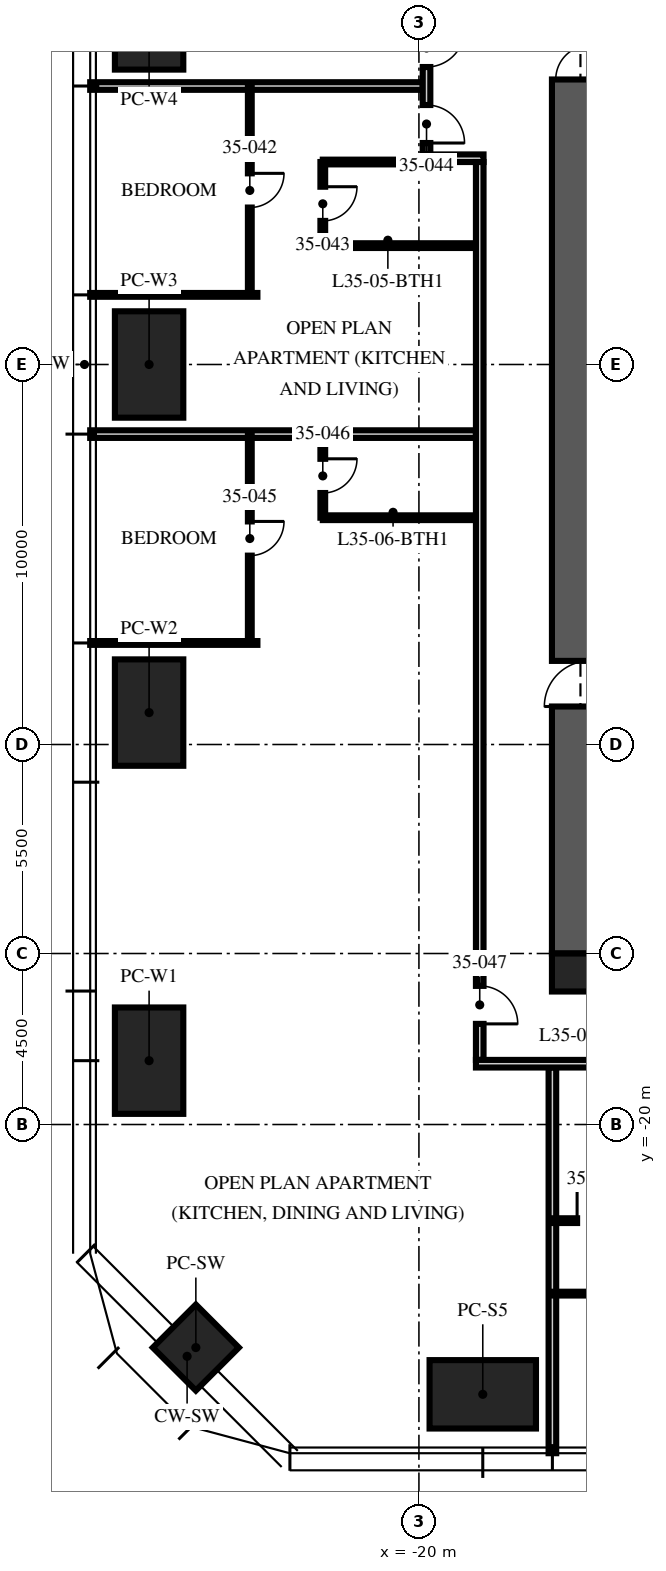
"""IFC4 building model, lengths in metres.
Left out: names, types, materials, properties, quantities, classifications, styles, units other than length and angle.
Written with IfcOpenShell. Run it as: python <this file> out.ifc"""

import sys

from ifc_helpers import new_model, si_unit, direction, frame, frame_2d, origin, origin_2d, place, context, subcontext, project, spatial, rectangle, extrude, element, fill, save


model = new_model("IFC4")
c1 = context("Model", 3, precision=1e-05, world=origin(), true_north=direction((0.0, 1.0)))
c2 = subcontext(c1, "Body", "Model", "MODEL_VIEW")
j1 = project(units=[si_unit("LENGTHUNIT", "METRE"), si_unit("PLANEANGLEUNIT", "RADIAN")], contexts=[c1])
p1 = place(None, origin())
s1 = spatial("IfcSite", under=j1, at=p1, CompositionType="ELEMENT")
p2 = place(p1, origin())
s2 = spatial("IfcBuilding", under=s1, at=p2, CompositionType="ELEMENT")
p3 = place(p2, frame((0.0, 0.0, 141.0)))
s3 = spatial("IfcBuildingStorey", under=s2, at=p3, CompositionType="ELEMENT", Elevation=141.0)
p4 = place(p3, frame((-15.5, -15.5, -0.25), z_axis=(0.0, 0.0, 1.0), x_axis=(0.0, 1.0, 0.0)))
e1 = element("IfcWall", 1, at=p4, inside=s3, PredefinedType="SHEAR", context=c2, shape_type="SweptSolid", body=[
    extrude(rectangle(XDim=31.0, YDim=2.0, at=frame_2d((15.5, 0.0))), origin(), (0.0, 0.0, 1.0), 3.75),
])
p5 = place(p4, frame((6.5, 0.0, 0.25)))
e2 = element("IfcOpeningElement", 2, at=p5, cuts=e1, PredefinedType="OPENING", context=c2, shape_type="SweptSolid", body=[
    extrude(rectangle(XDim=1.2, YDim=2.1, at=frame_2d((0.6, 1.05))), frame((0.0, 1.01, 0.0), z_axis=(0.0, -1.0, 0.0), x_axis=(1.0, 0.0, 0.0)), (0.0, 0.0, 1.0), 2.02),
])
p6 = place(p4, frame((23.0, 0.0, 0.25)))
e3 = element("IfcOpeningElement", 3, at=p6, cuts=e1, PredefinedType="OPENING", context=c2, shape_type="SweptSolid", body=[
    extrude(rectangle(XDim=1.8, YDim=2.1, at=frame_2d((0.9, 1.05))), frame((0.0, 1.01, 0.0), z_axis=(0.0, -1.0, 0.0), x_axis=(1.0, 0.0, 0.0)), (0.0, 0.0, 1.0), 2.02),
])
p7 = place(p3, frame((-16.0, -16.0, -0.25), z_axis=(0.0, 0.0, 1.0), x_axis=(1.0, 0.0, 0.0)))
e4 = element("IfcColumn", 4, at=p7, inside=s3, PredefinedType="COLUMN", context=c2, shape_type="SweptSolid", body=[
    extrude(rectangle(XDim=1.0, YDim=1.0, at=origin_2d()), origin(), (0.0, 0.0, 1.0), 3.75),
])
for number, where, z_axis, x_axis in (
    (5, (-18.32, -27.1, 0.0), (0.0, 0.0, 1.0), (1.0, 0.0, 0.0)),
    (6, (-27.1, -18.32, 0.0), (0.0, 0.0, 1.0), (0.0, 1.0, 0.0)),
    (7, (-27.1, -9.16, 0.0), (0.0, 0.0, 1.0), (0.0, 1.0, 0.0)),
    (8, (-27.1, 0.0, 0.0), (0.0, 0.0, 1.0), (0.0, 1.0, 0.0)),
    (9, (-27.1, 9.16, 0.0), (0.0, 0.0, 1.0), (0.0, 1.0, 0.0)),
):
    element("IfcColumn", number, at=place(p3, frame(where, z_axis=z_axis, x_axis=x_axis)), inside=s3, PredefinedType="COLUMN", context=c2, shape_type="SweptSolid", body=[
        extrude(rectangle(XDim=2.8, YDim=1.8, at=origin_2d()), origin(), (0.0, 0.0, 1.0), 3.75),
    ])
p8 = place(p3, frame((-25.87, -25.87, 0.0), z_axis=(0.0, 0.0, 1.0), x_axis=(0.707106781187, -0.707106781187, 0.0)))
e10 = element("IfcColumn", 10, at=p8, inside=s3, PredefinedType="COLUMN", context=c2, shape_type="SweptSolid", body=[
    extrude(rectangle(XDim=1.6, YDim=1.6, at=origin_2d()), origin(), (0.0, 0.0, 1.0), 3.75),
])
p9 = place(p3, frame((-19.9, 7.328, 0.0), z_axis=(0.0, 0.0, 1.0), x_axis=(-1.0, 0.0, 0.0)))
e11 = element("IfcWall", 11, at=p9, inside=s3, PredefinedType="PARTITIONING", context=c2, shape_type="SweptSolid", body=[
    extrude(rectangle(XDim=8.75, YDim=0.2, at=frame_2d((4.375, 0.0))), origin(), (0.0, 0.0, 1.0), 2.81),
])
p10 = place(p3, frame((-24.25, 1.832, 0.0), z_axis=(0.0, 0.0, 1.0), x_axis=(-1.0, 0.0, 0.0)))
e12 = element("IfcWall", 12, at=p10, inside=s3, PredefinedType="PARTITIONING", context=c2, shape_type="SweptSolid", body=[
    extrude(rectangle(XDim=4.4, YDim=0.1, at=frame_2d((2.2, 0.0))), origin(), (0.0, 0.0, 1.0), 2.81),
])
p11 = place(p3, frame((-18.5, -1.832, 0.0), z_axis=(0.0, 0.0, 1.0), x_axis=(-1.0, 0.0, 0.0)))
e13 = element("IfcWall", 13, at=p11, inside=s3, PredefinedType="PARTITIONING", context=c2, shape_type="SweptSolid", body=[
    extrude(rectangle(XDim=10.15, YDim=0.2, at=frame_2d((5.075, 0.0))), origin(), (0.0, 0.0, 1.0), 2.81),
])
p12 = place(p3, frame((-24.25, -7.328, 0.0), z_axis=(0.0, 0.0, 1.0), x_axis=(-1.0, 0.0, 0.0)))
e14 = element("IfcWall", 14, at=p12, inside=s3, PredefinedType="PARTITIONING", context=c2, shape_type="SweptSolid", body=[
    extrude(rectangle(XDim=4.4, YDim=0.1, at=frame_2d((2.2, 0.0))), origin(), (0.0, 0.0, 1.0), 2.81),
])
p13 = place(p3, frame((-16.488, -18.5, 0.0), z_axis=(0.0, 0.0, 1.0), x_axis=(0.0, -1.0, 0.0)))
e15 = element("IfcWall", 15, at=p13, inside=s3, PredefinedType="PARTITIONING", context=c2, shape_type="SweptSolid", body=[
    extrude(rectangle(XDim=10.15, YDim=0.2, at=frame_2d((5.075, 0.0))), origin(), (0.0, 0.0, 1.0), 2.81),
])
p14 = place(p3, frame((-24.45, 7.328, 0.0), z_axis=(0.0, 0.0, 1.0), x_axis=(0.0, -1.0, 0.0)))
e16 = element("IfcWall", 16, at=p14, inside=s3, PredefinedType="PARTITIONING", context=c2, shape_type="SweptSolid", body=[
    extrude(rectangle(XDim=5.496, YDim=0.1, at=frame_2d((2.748, 0.0))), origin(), (0.0, 0.0, 1.0), 2.81),
])
p15 = place(p14, frame((2.298, 0.0, 0.0)))
e17 = element("IfcOpeningElement", 17, at=p15, cuts=e16, PredefinedType="OPENING", context=c2, shape_type="SweptSolid", body=[
    extrude(rectangle(XDim=0.9, YDim=2.1, at=frame_2d((0.45, 1.05))), frame((0.0, 0.06, 0.0), z_axis=(0.0, -1.0, 0.0), x_axis=(1.0, 0.0, 0.0)), (0.0, 0.0, 1.0), 0.12),
])
p16 = place(p3, frame((-22.53, 5.328, 0.0), z_axis=(0.0, 0.0, 1.0), x_axis=(0.0, -1.0, 0.0)))
e18 = element("IfcWall", 18, at=p16, inside=s3, PredefinedType="PARTITIONING", context=c2, shape_type="SweptSolid", body=[
    extrude(rectangle(XDim=2.2, YDim=0.125, at=frame_2d((1.1, 0.0))), origin(), (0.0, 0.0, 1.0), 2.81),
])
p17 = place(p16, frame((0.65, 0.0, 0.0)))
e19 = element("IfcOpeningElement", 19, at=p17, cuts=e18, PredefinedType="OPENING", context=c2, shape_type="SweptSolid", body=[
    extrude(rectangle(XDim=0.9, YDim=2.1, at=frame_2d((0.45, 1.05))), frame((0.0, 0.073, 0.0), z_axis=(0.0, -1.0, 0.0), x_axis=(1.0, 0.0, 0.0)), (0.0, 0.0, 1.0), 0.145),
])
p18 = place(p3, frame((-19.97, 5.328, 0.0), z_axis=(0.0, 0.0, 1.0), x_axis=(-1.0, 0.0, 0.0)))
e20 = element("IfcWall", 20, at=p18, inside=s3, PredefinedType="PARTITIONING", context=c2, shape_type="SweptSolid", body=[
    extrude(rectangle(XDim=2.56, YDim=0.125, at=frame_2d((1.28, 0.0))), origin(), (0.0, 0.0, 1.0), 3.5),
])
p19 = place(p3, frame((-18.5, 3.128, 0.0), z_axis=(0.0, 0.0, 1.0), x_axis=(-1.0, 0.0, 0.0)))
e21 = element("IfcWall", 21, at=p19, inside=s3, PredefinedType="PARTITIONING", context=c2, shape_type="SweptSolid", body=[
    extrude(rectangle(XDim=4.03, YDim=0.125, at=frame_2d((2.015, 0.0))), origin(), (0.0, 0.0, 1.0), 3.5),
])
p20 = place(p3, frame((-24.45, -1.832, 0.0), z_axis=(0.0, 0.0, 1.0), x_axis=(0.0, -1.0, 0.0)))
e22 = element("IfcWall", 22, at=p20, inside=s3, PredefinedType="PARTITIONING", context=c2, shape_type="SweptSolid", body=[
    extrude(rectangle(XDim=5.496, YDim=0.1, at=frame_2d((2.748, 0.0))), origin(), (0.0, 0.0, 1.0), 2.81),
])
p21 = place(p20, frame((2.298, 0.0, 0.0)))
e23 = element("IfcOpeningElement", 23, at=p21, cuts=e22, PredefinedType="OPENING", context=c2, shape_type="SweptSolid", body=[
    extrude(rectangle(XDim=0.9, YDim=2.1, at=frame_2d((0.45, 1.05))), frame((0.0, 0.06, 0.0), z_axis=(0.0, -1.0, 0.0), x_axis=(1.0, 0.0, 0.0)), (0.0, 0.0, 1.0), 0.12),
])
p22 = place(p3, frame((-22.53, -1.832, 0.0), z_axis=(0.0, 0.0, 1.0), x_axis=(0.0, -1.0, 0.0)))
e24 = element("IfcWall", 24, at=p22, inside=s3, PredefinedType="PARTITIONING", context=c2, shape_type="SweptSolid", body=[
    extrude(rectangle(XDim=2.2, YDim=0.125, at=frame_2d((1.1, 0.0))), origin(), (0.0, 0.0, 1.0), 3.5),
])
p23 = place(p22, frame((0.65, 0.0, 0.0)))
e25 = element("IfcOpeningElement", 25, at=p23, cuts=e24, PredefinedType="OPENING", context=c2, shape_type="SweptSolid", body=[
    extrude(rectangle(XDim=0.9, YDim=2.1, at=frame_2d((0.45, 1.05))), frame((0.0, 0.073, 0.0), z_axis=(0.0, -1.0, 0.0), x_axis=(1.0, 0.0, 0.0)), (0.0, 0.0, 1.0), 0.145),
])
p24 = place(p3, frame((-18.5, -4.032, 0.0), z_axis=(0.0, 0.0, 1.0), x_axis=(-1.0, 0.0, 0.0)))
e26 = element("IfcWall", 26, at=p24, inside=s3, PredefinedType="PARTITIONING", context=c2, shape_type="SweptSolid", body=[
    extrude(rectangle(XDim=4.03, YDim=0.125, at=frame_2d((2.015, 0.0))), origin(), (0.0, 0.0, 1.0), 3.5),
])
p25 = place(p3, frame((-16.488, -24.45, 0.0), z_axis=(0.0, 0.0, 1.0), x_axis=(1.0, 0.0, 0.0)))
e27 = element("IfcWall", 27, at=p25, inside=s3, PredefinedType="PARTITIONING", context=c2, shape_type="SweptSolid", body=[
    extrude(rectangle(XDim=5.496, YDim=0.1, at=frame_2d((2.748, 0.0))), origin(), (0.0, 0.0, 1.0), 2.81),
])
p26 = place(p25, frame((2.298, 0.0, 0.0)))
e28 = element("IfcOpeningElement", 28, at=p26, cuts=e27, PredefinedType="OPENING", context=c2, shape_type="SweptSolid", body=[
    extrude(rectangle(XDim=0.9, YDim=2.1, at=frame_2d((0.45, 1.05))), frame((0.0, 0.06, 0.0), z_axis=(0.0, -1.0, 0.0), x_axis=(1.0, 0.0, 0.0)), (0.0, 0.0, 1.0), 0.12),
])
p27 = place(p3, frame((-16.488, -22.53, 0.0), z_axis=(0.0, 0.0, 1.0), x_axis=(1.0, 0.0, 0.0)))
e29 = element("IfcWall", 29, at=p27, inside=s3, PredefinedType="PARTITIONING", context=c2, shape_type="SweptSolid", body=[
    extrude(rectangle(XDim=2.2, YDim=0.125, at=frame_2d((1.1, 0.0))), origin(), (0.0, 0.0, 1.0), 3.5),
])
p28 = place(p27, frame((0.65, 0.0, 0.0)))
e30 = element("IfcOpeningElement", 30, at=p28, cuts=e29, PredefinedType="OPENING", context=c2, shape_type="SweptSolid", body=[
    extrude(rectangle(XDim=0.9, YDim=2.1, at=frame_2d((0.45, 1.05))), frame((0.0, 0.073, 0.0), z_axis=(0.0, -1.0, 0.0), x_axis=(1.0, 0.0, 0.0)), (0.0, 0.0, 1.0), 0.145),
])
p29 = place(p3, frame((-18.3, 5.428, 0.0), z_axis=(0.0, 0.0, 1.0), x_axis=(-1.0, 0.0, 0.0)))
e31 = element("IfcWall", 31, at=p29, inside=s3, PredefinedType="PARTITIONING", context=c2, shape_type="SweptSolid", body=[
    extrude(rectangle(XDim=1.6, YDim=0.2, at=frame_2d((0.8, 0.0))), origin(), (0.0, 0.0, 1.0), 3.5),
])
p30 = place(p3, frame((-19.8, 9.128, 0.0), z_axis=(0.0, 0.0, 1.0), x_axis=(0.0, -1.0, 0.0)))
e32 = element("IfcWall", 32, at=p30, inside=s3, PredefinedType="PARTITIONING", context=c2, shape_type="SweptSolid", body=[
    extrude(rectangle(XDim=3.6, YDim=0.2, at=frame_2d((1.8, 0.0))), origin(), (0.0, 0.0, 1.0), 2.7),
])
p31 = place(p30, frame((0.3, 0.0, 0.0)))
e33 = element("IfcOpeningElement", 33, at=p31, cuts=e32, PredefinedType="OPENING", context=c2, shape_type="SweptSolid", body=[
    extrude(rectangle(XDim=1.0, YDim=2.2, at=frame_2d((0.5, 1.1))), frame((0.0, 0.11, 0.0), z_axis=(0.0, -1.0, 0.0), x_axis=(1.0, 0.0, 0.0)), (0.0, 0.0, 1.0), 0.22),
])
p32 = place(p30, frame((2.3, 0.0, 0.0)))
e34 = element("IfcOpeningElement", 34, at=p32, cuts=e32, PredefinedType="OPENING", context=c2, shape_type="SweptSolid", body=[
    extrude(rectangle(XDim=1.0, YDim=2.2, at=frame_2d((0.5, 1.1))), frame((0.0, 0.11, 0.0), z_axis=(0.0, -1.0, 0.0), x_axis=(1.0, 0.0, 0.0)), (0.0, 0.0, 1.0), 0.22),
])
p33 = place(p3, frame((-18.4, 5.328, 0.0), z_axis=(0.0, 0.0, 1.0), x_axis=(0.0, -1.0, 0.0)))
e35 = element("IfcWall", 35, at=p33, inside=s3, PredefinedType="PARTITIONING", context=c2, shape_type="SweptSolid", body=[
    extrude(rectangle(XDim=23.628, YDim=0.2, at=frame_2d((11.814, 0.0))), origin(), (0.0, 0.0, 1.0), 2.3),
])
p34 = place(p33, frame((21.68, 0.0, 0.0)))
e36 = element("IfcOpeningElement", 36, at=p34, cuts=e35, PredefinedType="OPENING", context=c2, shape_type="SweptSolid", body=[
    extrude(rectangle(XDim=1.0, YDim=2.2, at=frame_2d((0.5, 1.1))), frame((0.0, 0.11, 0.0), z_axis=(0.0, -1.0, 0.0), x_axis=(1.0, 0.0, 0.0)), (0.0, 0.0, 1.0), 0.22),
])
p35 = place(p3, frame((-8.6, -18.4, 0.0), z_axis=(0.0, 0.0, 1.0), x_axis=(-1.0, 0.0, 0.0)))
e37 = element("IfcWall", 37, at=p35, inside=s3, PredefinedType="PARTITIONING", context=c2, shape_type="SweptSolid", body=[
    extrude(rectangle(XDim=9.9, YDim=0.2, at=frame_2d((4.95, 0.0))), origin(), (0.0, 0.0, 1.0), 2.3),
])
p36 = place(p35, frame((0.868, 0.0, 0.0)))
e38 = element("IfcOpeningElement", 38, at=p36, cuts=e37, PredefinedType="OPENING", context=c2, shape_type="SweptSolid", body=[
    extrude(rectangle(XDim=1.0, YDim=2.2, at=frame_2d((0.5, 1.1))), frame((0.0, 0.11, 0.0), z_axis=(0.0, -1.0, 0.0), x_axis=(1.0, 0.0, 0.0)), (0.0, 0.0, 1.0), 0.22),
])
p37 = place(p31, origin())
e39 = element("IfcDoor", 39, at=p37, inside=s3, OperationType="SINGLE_SWING_LEFT", PredefinedType="DOOR", context=c2, shape_type="SweptSolid", body=[
    extrude(rectangle(XDim=1.0, YDim=2.2, at=frame_2d((0.5, 1.1))), frame((0.0, 0.025, 0.0), z_axis=(0.0, -1.0, 0.0), x_axis=(1.0, 0.0, 0.0)), (0.0, 0.0, 1.0), 0.05),
])
fill(e33, e39)
p38 = place(p15, origin())
e40 = element("IfcDoor", 40, at=p38, inside=s3, OperationType="SINGLE_SWING_LEFT", PredefinedType="DOOR", context=c2, shape_type="SweptSolid", body=[
    extrude(rectangle(XDim=0.9, YDim=2.1, at=frame_2d((0.45, 1.05))), frame((0.0, 0.025, 0.0), z_axis=(0.0, -1.0, 0.0), x_axis=(1.0, 0.0, 0.0)), (0.0, 0.0, 1.0), 0.05),
])
fill(e17, e40)
p39 = place(p17, origin())
e41 = element("IfcDoor", 41, at=p39, inside=s3, OperationType="SINGLE_SWING_LEFT", PredefinedType="DOOR", context=c2, shape_type="SweptSolid", body=[
    extrude(rectangle(XDim=0.9, YDim=2.1, at=frame_2d((0.45, 1.05))), frame((0.0, 0.025, 0.0), z_axis=(0.0, -1.0, 0.0), x_axis=(1.0, 0.0, 0.0)), (0.0, 0.0, 1.0), 0.05),
])
fill(e19, e41)
p40 = place(p32, origin())
e42 = element("IfcDoor", 42, at=p40, inside=s3, OperationType="SINGLE_SWING_RIGHT", PredefinedType="DOOR", context=c2, shape_type="SweptSolid", body=[
    extrude(rectangle(XDim=1.0, YDim=2.2, at=frame_2d((0.5, 1.1))), frame((0.0, 0.025, 0.0), z_axis=(0.0, -1.0, 0.0), x_axis=(1.0, 0.0, 0.0)), (0.0, 0.0, 1.0), 0.05),
])
fill(e34, e42)
p41 = place(p21, origin())
e43 = element("IfcDoor", 43, at=p41, inside=s3, OperationType="SINGLE_SWING_LEFT", PredefinedType="DOOR", context=c2, shape_type="SweptSolid", body=[
    extrude(rectangle(XDim=0.9, YDim=2.1, at=frame_2d((0.45, 1.05))), frame((0.0, 0.025, 0.0), z_axis=(0.0, -1.0, 0.0), x_axis=(1.0, 0.0, 0.0)), (0.0, 0.0, 1.0), 0.05),
])
fill(e23, e43)
p42 = place(p23, origin())
e44 = element("IfcDoor", 44, at=p42, inside=s3, OperationType="SINGLE_SWING_LEFT", PredefinedType="DOOR", context=c2, shape_type="SweptSolid", body=[
    extrude(rectangle(XDim=0.9, YDim=2.1, at=frame_2d((0.45, 1.05))), frame((0.0, 0.025, 0.0), z_axis=(0.0, -1.0, 0.0), x_axis=(1.0, 0.0, 0.0)), (0.0, 0.0, 1.0), 0.05),
])
fill(e25, e44)
p43 = place(p34, origin())
e45 = element("IfcDoor", 45, at=p43, inside=s3, OperationType="SINGLE_SWING_RIGHT", PredefinedType="DOOR", context=c2, shape_type="SweptSolid", body=[
    extrude(rectangle(XDim=1.0, YDim=2.2, at=frame_2d((0.5, 1.1))), frame((0.0, 0.025, 0.0), z_axis=(0.0, -1.0, 0.0), x_axis=(1.0, 0.0, 0.0)), (0.0, 0.0, 1.0), 0.05),
])
fill(e36, e45)
p44 = place(p28, origin())
e46 = element("IfcDoor", 46, at=p44, inside=s3, OperationType="SINGLE_SWING_LEFT", PredefinedType="DOOR", context=c2, shape_type="SweptSolid", body=[
    extrude(rectangle(XDim=0.9, YDim=2.1, at=frame_2d((0.45, 1.05))), frame((0.0, 0.025, 0.0), z_axis=(0.0, -1.0, 0.0), x_axis=(1.0, 0.0, 0.0)), (0.0, 0.0, 1.0), 0.05),
])
fill(e30, e46)
save(model, sys.argv[1])
